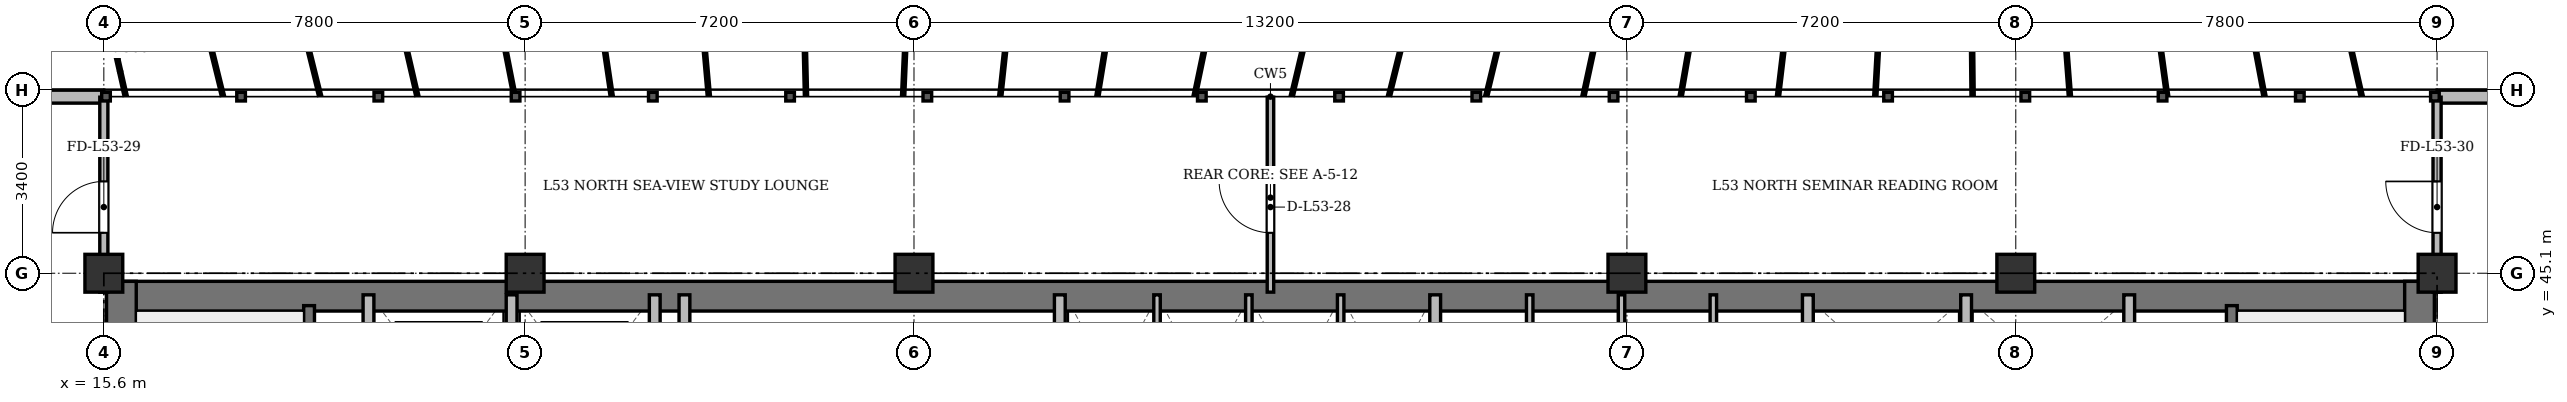
"""IFC4 building model, lengths in metres.
Left out: names, types, materials, properties, quantities, classifications, styles, units other than length and angle.
Written with IfcOpenShell. Run it as: python <this file> out.ifc"""

import sys

from ifc_helpers import new_model, si_unit, direction, frame, frame_2d, origin, origin_2d, place, context, subcontext, project, spatial, rectangle, extrude, source, transform, mapped, element, fill, save


model = new_model("IFC4")
c1 = context("Model", 3, precision=1e-05, world=origin(), true_north=direction((0.0, 1.0)))
c2 = subcontext(c1, "Body", "Model", "MODEL_VIEW")
j1 = project(units=[si_unit("LENGTHUNIT", "METRE"), si_unit("PLANEANGLEUNIT", "RADIAN")], contexts=[c1])
p1 = place(None, origin())
s1 = spatial("IfcSite", under=j1, at=p1, CompositionType="ELEMENT")
p2 = place(p1, origin())
s2 = spatial("IfcBuilding", under=s1, at=p2, CompositionType="ELEMENT")
p3 = place(p2, frame((0.0, 0.0, 204.9)))
s3 = spatial("IfcBuildingStorey", under=s2, at=p3, CompositionType="ELEMENT", Elevation=204.9)
m1 = source(origin(), c2, "Body", "SweptSolid", [
    extrude(rectangle(XDim=0.7, YDim=0.7, at=origin_2d()), origin(), (0.0, 0.0, 1.0), 3.6),
])
for number, where, z_axis, x_axis in (
    (1, (15.6, 45.1, 0.0), (0.0, 0.0, 1.0), (1.0, 0.0, 0.0)),
    (2, (23.4, 45.1, 0.0), (0.0, 0.0, 1.0), (1.0, 0.0, 0.0)),
    (3, (30.6, 45.1, 0.0), (0.0, 0.0, 1.0), (1.0, 0.0, 0.0)),
    (4, (43.8, 45.1, 0.0), (0.0, 0.0, 1.0), (1.0, 0.0, 0.0)),
    (5, (51.0, 45.1, 0.0), (0.0, 0.0, 1.0), (1.0, 0.0, 0.0)),
    (6, (58.8, 45.1, 0.0), (0.0, 0.0, 1.0), (1.0, 0.0, 0.0)),
):
    element("IfcColumn", number, at=place(p3, frame(where, z_axis=z_axis, x_axis=x_axis)), inside=s3, PredefinedType="COLUMN", context=c2, shape_type="MappedRepresentation", body=[
        mapped(m1, transform((0.0, 0.0, 0.0), x_axis=(1.0, 0.0, 0.0), y_axis=(0.0, 1.0, 0.0), z_axis=(0.0, 0.0, 1.0), scale=1.0)),
    ])
p4 = place(p3, frame((11.1, 48.37, 0.0), z_axis=(0.0, 0.0, 1.0), x_axis=(1.0, 0.0, 0.0)))
e7 = element("IfcWall", 7, at=p4, inside=s3, PredefinedType="SOLIDWALL", context=c2, shape_type="SweptSolid", body=[
    extrude(rectangle(XDim=4.5, YDim=0.24, at=frame_2d((2.25, 0.0))), origin(), (0.0, 0.0, 1.0), 3.36),
])
p5 = place(p4, frame((2.003, 0.0, 0.9)))
e8 = element("IfcOpeningElement", 8, at=p5, cuts=e7, PredefinedType="OPENING", context=c2, shape_type="SweptSolid", body=[
    extrude(rectangle(XDim=1.35, YDim=1.5, at=frame_2d((0.675, 0.75))), frame((0.0, 0.13, 0.0), z_axis=(0.0, -1.0, 0.0), x_axis=(1.0, 0.0, 0.0)), (0.0, 0.0, 1.0), 0.26),
])
p6 = place(p3, frame((58.8, 48.37, 0.0), z_axis=(0.0, 0.0, 1.0), x_axis=(1.0, 0.0, 0.0)))
e9 = element("IfcWall", 9, at=p6, inside=s3, PredefinedType="SOLIDWALL", context=c2, shape_type="SweptSolid", body=[
    extrude(rectangle(XDim=4.5, YDim=0.24, at=frame_2d((2.25, 0.0))), origin(), (0.0, 0.0, 1.0), 3.36),
])
p7 = place(p6, frame((1.147, 0.0, 0.9)))
e10 = element("IfcOpeningElement", 10, at=p7, cuts=e9, PredefinedType="OPENING", context=c2, shape_type="SweptSolid", body=[
    extrude(rectangle(XDim=1.35, YDim=1.5, at=frame_2d((0.675, 0.75))), frame((0.0, 0.13, 0.0), z_axis=(0.0, -1.0, 0.0), x_axis=(1.0, 0.0, 0.0)), (0.0, 0.0, 1.0), 0.26),
])
p8 = place(p3, frame((15.65, 44.675, 0.0), z_axis=(0.0, 0.0, 1.0), x_axis=(1.0, 0.0, 0.0)))
e11 = element("IfcWall", 11, at=p8, inside=s3, PredefinedType="SHEAR", context=c2, shape_type="SweptSolid", body=[
    extrude(rectangle(XDim=43.1, YDim=0.55, at=frame_2d((21.55, 0.0))), origin(), (0.0, 0.0, 1.0), 3.36),
])
for number, where, z_axis, x_axis in (
    (12, (15.925, 33.4, 0.0), (0.0, 0.0, 1.0), (0.0, 1.0, 0.0)),
    (13, (58.475, 33.4, 0.0), (0.0, 0.0, 1.0), (0.0, 1.0, 0.0)),
):
    element("IfcWall", number, at=place(p3, frame(where, z_axis=z_axis, x_axis=x_axis)), inside=s3, PredefinedType="SHEAR", context=c2, shape_type="SweptSolid", body=[
        extrude(rectangle(XDim=11.55, YDim=0.55, at=frame_2d((5.775, 0.0))), origin(), (0.0, 0.0, 1.0), 3.36),
    ])
p9 = place(p3, frame((19.4, 33.4, 0.0), z_axis=(0.0, 0.0, 1.0), x_axis=(0.0, 1.0, 0.0)))
e14 = element("IfcWall", 14, at=p9, inside=s3, PredefinedType="SHEAR", context=c2, shape_type="SweptSolid", body=[
    extrude(rectangle(XDim=11.1, YDim=0.2, at=frame_2d((5.55, 0.0))), origin(), (0.0, 0.0, 1.0), 3.36),
])
p10 = place(p9, frame((0.85, 0.0, 0.0)))
e15 = element("IfcOpeningElement", 15, at=p10, cuts=e14, PredefinedType="OPENING", context=c2, shape_type="SweptSolid", body=[
    extrude(rectangle(XDim=1.1, YDim=2.15, at=frame_2d((0.55, 1.075))), frame((0.0, 0.11, 0.0), z_axis=(0.0, -1.0, 0.0), x_axis=(1.0, 0.0, 0.0)), (0.0, 0.0, 1.0), 0.22),
])
p11 = place(p3, frame((55.0, 33.4, 0.0), z_axis=(0.0, 0.0, 1.0), x_axis=(0.0, 1.0, 0.0)))
e16 = element("IfcWall", 16, at=p11, inside=s3, PredefinedType="SHEAR", context=c2, shape_type="SweptSolid", body=[
    extrude(rectangle(XDim=11.1, YDim=0.2, at=frame_2d((5.55, 0.0))), origin(), (0.0, 0.0, 1.0), 3.36),
])
p12 = place(p11, frame((0.85, 0.0, 0.0)))
e17 = element("IfcOpeningElement", 17, at=p12, cuts=e16, PredefinedType="OPENING", context=c2, shape_type="SweptSolid", body=[
    extrude(rectangle(XDim=1.1, YDim=2.15, at=frame_2d((0.55, 1.075))), frame((0.0, 0.11, 0.0), z_axis=(0.0, -1.0, 0.0), x_axis=(1.0, 0.0, 0.0)), (0.0, 0.0, 1.0), 0.22),
])
for number, where, z_axis, x_axis in (
    (18, (20.5, 41.3, 0.0), (0.0, 0.0, 1.0), (0.0, 1.0, 0.0)),
    (19, (23.15, 41.3, 0.0), (0.0, 0.0, 1.0), (0.0, 1.0, 0.0)),
    (20, (25.8, 41.3, 0.0), (0.0, 0.0, 1.0), (0.0, 1.0, 0.0)),
):
    element("IfcWall", number, at=place(p3, frame(where, z_axis=z_axis, x_axis=x_axis)), inside=s3, PredefinedType="SOLIDWALL", context=c2, shape_type="SweptSolid", body=[
        extrude(rectangle(XDim=3.4, YDim=0.2, at=frame_2d((1.7, 0.0))), origin(), (0.0, 0.0, 1.0), 3.36),
    ])
for number, where, z_axis, x_axis in (
    (21, (26.35, 33.4, 0.0), (0.0, 0.0, 1.0), (0.0, 1.0, 0.0)),
    (22, (33.3, 33.4, 0.0), (0.0, 0.0, 1.0), (0.0, 1.0, 0.0)),
):
    element("IfcWall", number, at=place(p3, frame(where, z_axis=z_axis, x_axis=x_axis)), inside=s3, PredefinedType="SOLIDWALL", context=c2, shape_type="SweptSolid", body=[
        extrude(rectangle(XDim=11.3, YDim=0.2, at=frame_2d((5.65, 0.0))), origin(), (0.0, 0.0, 1.0), 2.91),
    ])
for number, where, z_axis, x_axis in (
    (23, (35.1, 41.5, 0.0), (0.0, 0.0, 1.0), (0.0, 1.0, 0.0)),
    (24, (36.8, 41.5, 0.0), (0.0, 0.0, 1.0), (0.0, 1.0, 0.0)),
    (25, (38.5, 41.5, 0.0), (0.0, 0.0, 1.0), (0.0, 1.0, 0.0)),
):
    element("IfcWall", number, at=place(p3, frame(where, z_axis=z_axis, x_axis=x_axis)), inside=s3, PredefinedType="PARTITIONING", context=c2, shape_type="SweptSolid", body=[
        extrude(rectangle(XDim=3.2, YDim=0.12, at=frame_2d((1.6, 0.0))), origin(), (0.0, 0.0, 1.0), 3.36),
    ])
p13 = place(p3, frame((40.25, 41.5, 0.0), z_axis=(0.0, 0.0, 1.0), x_axis=(0.0, 1.0, 0.0)))
e26 = element("IfcWall", 26, at=p13, inside=s3, PredefinedType="SOLIDWALL", context=c2, shape_type="SweptSolid", body=[
    extrude(rectangle(XDim=3.2, YDim=0.2, at=frame_2d((1.6, 0.0))), origin(), (0.0, 0.0, 1.0), 3.36),
])
p14 = place(p3, frame((42.0, 41.5, 0.0), z_axis=(0.0, 0.0, 1.0), x_axis=(0.0, 1.0, 0.0)))
e27 = element("IfcWall", 27, at=p14, inside=s3, PredefinedType="PARTITIONING", context=c2, shape_type="SweptSolid", body=[
    extrude(rectangle(XDim=3.2, YDim=0.12, at=frame_2d((1.6, 0.0))), origin(), (0.0, 0.0, 1.0), 3.36),
])
p15 = place(p3, frame((43.7, 41.5, 0.0), z_axis=(0.0, 0.0, 1.0), x_axis=(0.0, 1.0, 0.0)))
e28 = element("IfcWall", 28, at=p15, inside=s3, PredefinedType="PARTITIONING", context=c2, shape_type="SweptSolid", body=[
    extrude(rectangle(XDim=3.2, YDim=0.12, at=frame_2d((1.6, 0.0))), origin(), (0.0, 0.0, 1.0), 2.86),
])
p16 = place(p3, frame((45.4, 41.5, 0.0), z_axis=(0.0, 0.0, 1.0), x_axis=(0.0, 1.0, 0.0)))
e29 = element("IfcWall", 29, at=p16, inside=s3, PredefinedType="PARTITIONING", context=c2, shape_type="SweptSolid", body=[
    extrude(rectangle(XDim=3.2, YDim=0.12, at=frame_2d((1.6, 0.0))), origin(), (0.0, 0.0, 1.0), 3.36),
])
p17 = place(p3, frame((47.15, 33.4, 0.0), z_axis=(0.0, 0.0, 1.0), x_axis=(0.0, 1.0, 0.0)))
e30 = element("IfcWall", 30, at=p17, inside=s3, PredefinedType="SOLIDWALL", context=c2, shape_type="SweptSolid", body=[
    extrude(rectangle(XDim=11.3, YDim=0.2, at=frame_2d((5.65, 0.0))), origin(), (0.0, 0.0, 1.0), 2.91),
])
for number, where, z_axis, x_axis in (
    (31, (50.08, 42.05, 0.0), (0.0, 0.0, 1.0), (0.0, 1.0, 0.0)),
    (32, (53.1, 42.05, 0.0), (0.0, 0.0, 1.0), (0.0, 1.0, 0.0)),
):
    element("IfcWall", number, at=place(p3, frame(where, z_axis=z_axis, x_axis=x_axis)), inside=s3, PredefinedType="SOLIDWALL", context=c2, shape_type="SweptSolid", body=[
        extrude(rectangle(XDim=2.65, YDim=0.2, at=frame_2d((1.325, 0.0))), origin(), (0.0, 0.0, 1.0), 3.36),
    ])
p18 = place(p3, frame((37.2, 44.75, 0.0), z_axis=(0.0, 0.0, 1.0), x_axis=(0.0, 1.0, 0.0)))
e33 = element("IfcWall", 33, at=p18, inside=s3, PredefinedType="PARTITIONING", context=c2, shape_type="SweptSolid", body=[
    extrude(rectangle(XDim=3.61, YDim=0.12, at=frame_2d((1.805, 0.0))), origin(), (0.0, 0.0, 1.0), 2.91),
])
p19 = place(p18, frame((1.1, 0.0, 0.0)))
e34 = element("IfcOpeningElement", 34, at=p19, cuts=e33, PredefinedType="OPENING", context=c2, shape_type="SweptSolid", body=[
    extrude(rectangle(XDim=0.95, YDim=2.15, at=frame_2d((0.475, 1.075))), frame((0.0, 0.07, 0.0), z_axis=(0.0, -1.0, 0.0), x_axis=(1.0, 0.0, 0.0)), (0.0, 0.0, 1.0), 0.14),
])
p20 = place(p3, frame((15.6, 44.75, 0.0), z_axis=(0.0, 0.0, 1.0), x_axis=(0.0, 1.0, 0.0)))
e35 = element("IfcWall", 35, at=p20, inside=s3, PredefinedType="PARTITIONING", context=c2, shape_type="SweptSolid", body=[
    extrude(rectangle(XDim=3.61, YDim=0.15, at=frame_2d((1.805, 0.0))), origin(), (0.0, 0.0, 1.0), 2.86),
])
p21 = place(p20, frame((1.1, 0.0, 0.0)))
e36 = element("IfcOpeningElement", 36, at=p21, cuts=e35, PredefinedType="OPENING", context=c2, shape_type="SweptSolid", body=[
    extrude(rectangle(XDim=0.95, YDim=2.15, at=frame_2d((0.475, 1.075))), frame((0.0, 0.085, 0.0), z_axis=(0.0, -1.0, 0.0), x_axis=(1.0, 0.0, 0.0)), (0.0, 0.0, 1.0), 0.17),
])
p22 = place(p3, frame((58.8, 44.75, 0.0), z_axis=(0.0, 0.0, 1.0), x_axis=(0.0, 1.0, 0.0)))
e37 = element("IfcWall", 37, at=p22, inside=s3, PredefinedType="PARTITIONING", context=c2, shape_type="SweptSolid", body=[
    extrude(rectangle(XDim=3.61, YDim=0.15, at=frame_2d((1.805, 0.0))), origin(), (0.0, 0.0, 1.0), 2.86),
])
p23 = place(p22, frame((1.1, 0.0, 0.0)))
e38 = element("IfcOpeningElement", 38, at=p23, cuts=e37, PredefinedType="OPENING", context=c2, shape_type="SweptSolid", body=[
    extrude(rectangle(XDim=0.95, YDim=2.15, at=frame_2d((0.475, 1.075))), frame((0.0, 0.085, 0.0), z_axis=(0.0, -1.0, 0.0), x_axis=(1.0, 0.0, 0.0)), (0.0, 0.0, 1.0), 0.17),
])
m2 = source(origin(), c2, "Body", "SweptSolid", [
    extrude(rectangle(XDim=0.95, YDim=2.15, at=frame_2d((0.475, 1.075))), frame((0.0, 0.025, 0.0), z_axis=(0.0, -1.0, 0.0), x_axis=(1.0, 0.0, 0.0)), (0.0, 0.0, 1.0), 0.05),
])
p24 = place(p19, origin())
e39 = element("IfcDoor", 39, at=p24, inside=s3, OperationType="SINGLE_SWING_RIGHT", PredefinedType="DOOR", context=c2, shape_type="MappedRepresentation", body=[
    mapped(m2, transform((0.0, 0.0, 0.0), x_axis=(1.0, 0.0, 0.0), y_axis=(0.0, 1.0, 0.0), z_axis=(0.0, 0.0, 1.0), scale=1.0)),
])
fill(e34, e39)
p25 = place(p21, origin())
e40 = element("IfcDoor", 40, at=p25, inside=s3, OperationType="SINGLE_SWING_LEFT", PredefinedType="DOOR", context=c2, shape_type="MappedRepresentation", body=[
    mapped(m2, transform((0.0, 0.0, 0.0), x_axis=(1.0, 0.0, 0.0), y_axis=(0.0, 1.0, 0.0), z_axis=(0.0, 0.0, 1.0), scale=1.0)),
])
fill(e36, e40)
p26 = place(p23, origin())
e41 = element("IfcDoor", 41, at=p26, inside=s3, OperationType="SINGLE_SWING_RIGHT", PredefinedType="DOOR", context=c2, shape_type="MappedRepresentation", body=[
    mapped(m2, transform((0.0, 0.0, 0.0), x_axis=(1.0, 0.0, 0.0), y_axis=(0.0, 1.0, 0.0), z_axis=(0.0, 0.0, 1.0), scale=1.0)),
])
fill(e38, e41)
save(model, sys.argv[1])
